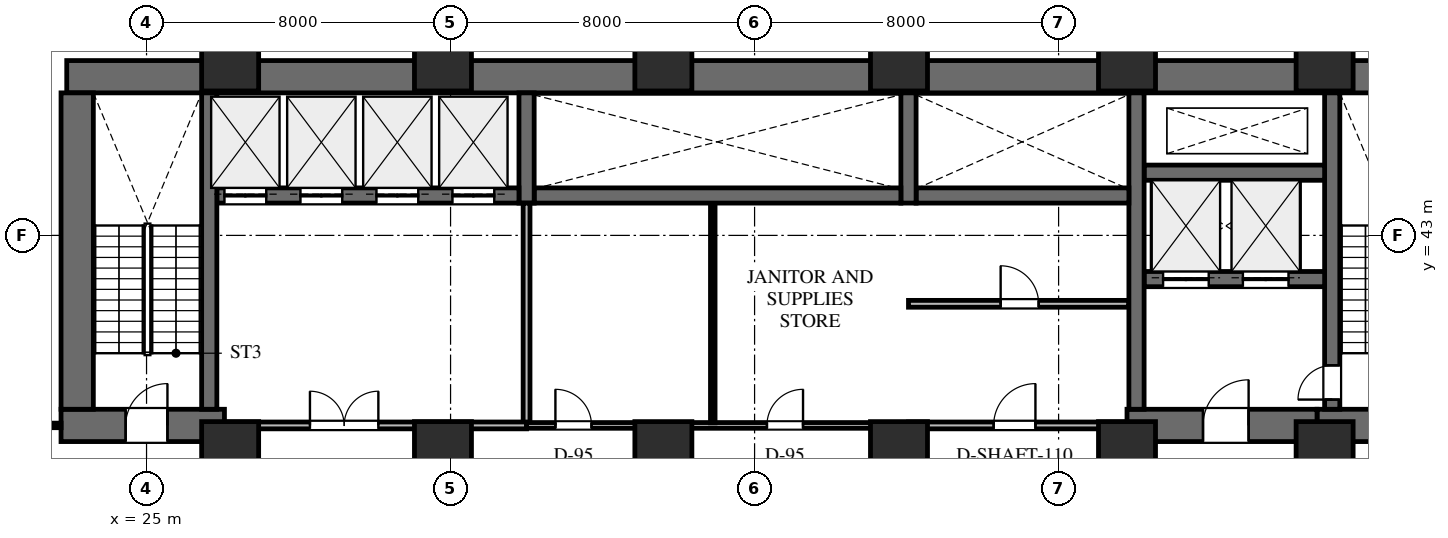
"""IFC4 building model, lengths in metres.
Left out: names, types, materials, properties, quantities, classifications, styles, units other than length and angle.
Written with IfcOpenShell. Run it as: python <this file> out.ifc"""

import sys

from ifc_helpers import new_model, si_unit, direction, frame, frame_2d, origin, origin_2d, place, context, subcontext, project, spatial, rectangle, extrude, element, fill, save


model = new_model("IFC4")
c1 = context("Model", 3, precision=1e-05, world=origin(), true_north=direction((0.0, 1.0)))
c2 = subcontext(c1, "Body", "Model", "MODEL_VIEW")
j1 = project(units=[si_unit("LENGTHUNIT", "METRE"), si_unit("PLANEANGLEUNIT", "RADIAN")], contexts=[c1])
p1 = place(None, origin())
s1 = spatial("IfcSite", under=j1, at=p1, CompositionType="ELEMENT")
p2 = place(p1, origin())
s2 = spatial("IfcBuilding", under=s1, at=p2, CompositionType="ELEMENT")
p3 = place(p2, frame((0.0, 0.0, 10.8)))
s3 = spatial("IfcBuildingStorey", under=s2, at=p3, CompositionType="ELEMENT", Elevation=10.8)
p4 = place(p3, frame((22.9, 47.175, 0.0), z_axis=(0.0, 0.0, 1.0), x_axis=(1.0, 0.0, 0.0)))
e1 = element("IfcWall", 1, at=p4, inside=s3, PredefinedType="SHEAR", context=c2, shape_type="SweptSolid", body=[
    extrude(rectangle(XDim=43.8, YDim=0.85, at=frame_2d((21.9, 0.0))), origin(), (0.0, 0.0, 1.0), 4.5),
])
p5 = place(p3, frame((55.8, 38.0, 0.0), z_axis=(0.0, 0.0, 1.0), x_axis=(1.0, 0.0, 0.0)))
e2 = element("IfcWall", 2, at=p5, inside=s3, PredefinedType="SHEAR", context=c2, shape_type="SweptSolid", body=[
    extrude(rectangle(XDim=10.9, YDim=0.85, at=frame_2d((5.45, 0.0))), origin(), (0.0, 0.0, 1.0), 4.5),
])
p6 = place(p5, frame((1.5, 0.0, 0.0)))
e3 = element("IfcOpeningElement", 3, at=p6, cuts=e2, PredefinedType="OPENING", context=c2, shape_type="SweptSolid", body=[
    extrude(rectangle(XDim=1.1, YDim=2.2, at=frame_2d((0.55, 1.1))), frame((0.0, 0.435, 0.0), z_axis=(0.0, -1.0, 0.0), x_axis=(1.0, 0.0, 0.0)), (0.0, 0.0, 1.0), 0.87),
])
p7 = place(p5, frame((4.82, 0.0, 0.0)))
e4 = element("IfcOpeningElement", 4, at=p7, cuts=e2, PredefinedType="OPENING", context=c2, shape_type="SweptSolid", body=[
    extrude(rectangle(XDim=1.0, YDim=2.15, at=frame_2d((0.5, 1.075))), frame((0.0, 0.435, 0.0), z_axis=(0.0, -1.0, 0.0), x_axis=(1.0, 0.0, 0.0)), (0.0, 0.0, 1.0), 0.87),
])
p8 = place(p5, frame((8.05, 0.0, 0.0)))
e5 = element("IfcOpeningElement", 5, at=p8, cuts=e2, PredefinedType="OPENING", context=c2, shape_type="SweptSolid", body=[
    extrude(rectangle(XDim=1.1, YDim=2.2, at=frame_2d((0.55, 1.1))), frame((0.0, 0.435, 0.0), z_axis=(0.0, -1.0, 0.0), x_axis=(1.0, 0.0, 0.0)), (0.0, 0.0, 1.0), 0.87),
])
p9 = place(p3, frame((56.2, 38.425, 0.0), z_axis=(0.0, 0.0, 1.0), x_axis=(0.0, 1.0, 0.0)))
e6 = element("IfcWall", 6, at=p9, inside=s3, PredefinedType="SHEAR", context=c2, shape_type="SweptSolid", body=[
    extrude(rectangle(XDim=8.325, YDim=0.4, at=frame_2d((4.163, 0.0))), origin(), (0.0, 0.0, 1.0), 4.5),
])
p10 = place(p9, frame((0.255, 0.0, 0.0)))
e7 = element("IfcOpeningElement", 7, at=p10, cuts=e6, PredefinedType="OPENING", context=c2, shape_type="SweptSolid", body=[
    extrude(rectangle(XDim=0.9, YDim=2.15, at=frame_2d((0.45, 1.075))), frame((0.0, 0.21, 0.0), z_axis=(0.0, -1.0, 0.0), x_axis=(1.0, 0.0, 0.0)), (0.0, 0.0, 1.0), 0.42),
])
p11 = place(p3, frame((50.8, 38.0, 0.0), z_axis=(0.0, 0.0, 1.0), x_axis=(1.0, 0.0, 0.0)))
e8 = element("IfcWall", 8, at=p11, inside=s3, PredefinedType="SHEAR", context=c2, shape_type="SweptSolid", body=[
    extrude(rectangle(XDim=5.0, YDim=0.85, at=frame_2d((2.5, 0.0))), origin(), (0.0, 0.0, 1.0), 4.5),
])
p12 = place(p11, frame((2.0, 0.0, 0.0)))
e9 = element("IfcOpeningElement", 9, at=p12, cuts=e8, PredefinedType="OPENING", context=c2, shape_type="SweptSolid", body=[
    extrude(rectangle(XDim=1.2, YDim=2.2, at=frame_2d((0.6, 1.1))), frame((0.0, 0.435, 0.0), z_axis=(0.0, -1.0, 0.0), x_axis=(1.0, 0.0, 0.0)), (0.0, 0.0, 1.0), 0.87),
])
p13 = place(p3, frame((51.25, 41.85, 0.0), z_axis=(0.0, 0.0, 1.0), x_axis=(1.0, 0.0, 0.0)))
e10 = element("IfcWall", 10, at=p13, inside=s3, PredefinedType="SHEAR", context=c2, shape_type="SweptSolid", body=[
    extrude(rectangle(XDim=4.75, YDim=0.4, at=frame_2d((2.375, 0.0))), origin(), (0.0, 0.0, 1.0), 4.5),
])
p14 = place(p13, frame((0.5, 0.0, 0.0)))
e11 = element("IfcOpeningElement", 11, at=p14, cuts=e10, PredefinedType="OPENING", context=c2, shape_type="SweptSolid", body=[
    extrude(rectangle(XDim=1.2, YDim=2.2, at=frame_2d((0.6, 1.1))), frame((0.0, 0.21, 0.0), z_axis=(0.0, -1.0, 0.0), x_axis=(1.0, 0.0, 0.0)), (0.0, 0.0, 1.0), 0.42),
])
p15 = place(p13, frame((2.6, 0.0, 0.0)))
e12 = element("IfcOpeningElement", 12, at=p15, cuts=e10, PredefinedType="OPENING", context=c2, shape_type="SweptSolid", body=[
    extrude(rectangle(XDim=1.2, YDim=2.2, at=frame_2d((0.6, 1.1))), frame((0.0, 0.21, 0.0), z_axis=(0.0, -1.0, 0.0), x_axis=(1.0, 0.0, 0.0)), (0.0, 0.0, 1.0), 0.42),
])
p16 = place(p3, frame((51.25, 44.65, 0.0), z_axis=(0.0, 0.0, 1.0), x_axis=(1.0, 0.0, 0.0)))
e13 = element("IfcWall", 13, at=p16, inside=s3, PredefinedType="SHEAR", context=c2, shape_type="SweptSolid", body=[
    extrude(rectangle(XDim=4.75, YDim=0.4, at=frame_2d((2.375, 0.0))), origin(), (0.0, 0.0, 1.0), 4.5),
])
p17 = place(p3, frame((51.05, 38.425, 0.0), z_axis=(0.0, 0.0, 1.0), x_axis=(0.0, 1.0, 0.0)))
e14 = element("IfcWall", 14, at=p17, inside=s3, PredefinedType="SHEAR", context=c2, shape_type="SweptSolid", body=[
    extrude(rectangle(XDim=8.325, YDim=0.4, at=frame_2d((4.163, 0.0))), origin(), (0.0, 0.0, 1.0), 4.5),
])
p18 = place(p3, frame((45.25, 44.05, 0.0), z_axis=(0.0, 0.0, 1.0), x_axis=(1.0, 0.0, 0.0)))
e15 = element("IfcWall", 15, at=p18, inside=s3, PredefinedType="SHEAR", context=c2, shape_type="SweptSolid", body=[
    extrude(rectangle(XDim=5.6, YDim=0.4, at=frame_2d((2.8, 0.0))), origin(), (0.0, 0.0, 1.0), 4.5),
])
p19 = place(p3, frame((45.05, 43.85, 0.0), z_axis=(0.0, 0.0, 1.0), x_axis=(0.0, 1.0, 0.0)))
e16 = element("IfcWall", 16, at=p19, inside=s3, PredefinedType="SHEAR", context=c2, shape_type="SweptSolid", body=[
    extrude(rectangle(XDim=2.9, YDim=0.4, at=frame_2d((1.45, 0.0))), origin(), (0.0, 0.0, 1.0), 4.5),
])
p20 = place(p3, frame((35.2, 44.05, 0.0), z_axis=(0.0, 0.0, 1.0), x_axis=(1.0, 0.0, 0.0)))
e17 = element("IfcWall", 17, at=p20, inside=s3, PredefinedType="SHEAR", context=c2, shape_type="SweptSolid", body=[
    extrude(rectangle(XDim=9.65, YDim=0.4, at=frame_2d((4.825, 0.0))), origin(), (0.0, 0.0, 1.0), 4.5),
])
p21 = place(p3, frame((35.0, 43.85, 0.0), z_axis=(0.0, 0.0, 1.0), x_axis=(0.0, 1.0, 0.0)))
e18 = element("IfcWall", 18, at=p21, inside=s3, PredefinedType="SHEAR", context=c2, shape_type="SweptSolid", body=[
    extrude(rectangle(XDim=2.9, YDim=0.4, at=frame_2d((1.45, 0.0))), origin(), (0.0, 0.0, 1.0), 4.5),
])
p22 = place(p3, frame((26.85, 44.05, 0.0), z_axis=(0.0, 0.0, 1.0), x_axis=(1.0, 0.0, 0.0)))
e19 = element("IfcWall", 19, at=p22, inside=s3, PredefinedType="SHEAR", context=c2, shape_type="SweptSolid", body=[
    extrude(rectangle(XDim=7.95, YDim=0.4, at=frame_2d((3.975, 0.0))), origin(), (0.0, 0.0, 1.0), 4.5),
])
p23 = place(p22, frame((0.2, 0.0, 0.0)))
e20 = element("IfcOpeningElement", 20, at=p23, cuts=e19, PredefinedType="OPENING", context=c2, shape_type="SweptSolid", body=[
    extrude(rectangle(XDim=1.1, YDim=2.2, at=frame_2d((0.55, 1.1))), frame((0.0, 0.21, 0.0), z_axis=(0.0, -1.0, 0.0), x_axis=(1.0, 0.0, 0.0)), (0.0, 0.0, 1.0), 0.42),
])
p24 = place(p22, frame((2.2, 0.0, 0.0)))
e21 = element("IfcOpeningElement", 21, at=p24, cuts=e19, PredefinedType="OPENING", context=c2, shape_type="SweptSolid", body=[
    extrude(rectangle(XDim=1.1, YDim=2.2, at=frame_2d((0.55, 1.1))), frame((0.0, 0.21, 0.0), z_axis=(0.0, -1.0, 0.0), x_axis=(1.0, 0.0, 0.0)), (0.0, 0.0, 1.0), 0.42),
])
p25 = place(p22, frame((4.2, 0.0, 0.0)))
e22 = element("IfcOpeningElement", 22, at=p25, cuts=e19, PredefinedType="OPENING", context=c2, shape_type="SweptSolid", body=[
    extrude(rectangle(XDim=1.1, YDim=2.2, at=frame_2d((0.55, 1.1))), frame((0.0, 0.21, 0.0), z_axis=(0.0, -1.0, 0.0), x_axis=(1.0, 0.0, 0.0)), (0.0, 0.0, 1.0), 0.42),
])
p26 = place(p22, frame((6.2, 0.0, 0.0)))
e23 = element("IfcOpeningElement", 23, at=p26, cuts=e19, PredefinedType="OPENING", context=c2, shape_type="SweptSolid", body=[
    extrude(rectangle(XDim=1.1, YDim=2.2, at=frame_2d((0.55, 1.1))), frame((0.0, 0.21, 0.0), z_axis=(0.0, -1.0, 0.0), x_axis=(1.0, 0.0, 0.0)), (0.0, 0.0, 1.0), 0.42),
])
p27 = place(p3, frame((22.75, 38.0, 0.0), z_axis=(0.0, 0.0, 1.0), x_axis=(1.0, 0.0, 0.0)))
e24 = element("IfcWall", 24, at=p27, inside=s3, PredefinedType="SHEAR", context=c2, shape_type="SweptSolid", body=[
    extrude(rectangle(XDim=4.3, YDim=0.85, at=frame_2d((2.15, 0.0))), origin(), (0.0, 0.0, 1.0), 4.5),
])
p28 = place(p27, frame((1.7, 0.0, 0.0)))
e25 = element("IfcOpeningElement", 25, at=p28, cuts=e24, PredefinedType="OPENING", context=c2, shape_type="SweptSolid", body=[
    extrude(rectangle(XDim=1.1, YDim=2.2, at=frame_2d((0.55, 1.1))), frame((0.0, 0.435, 0.0), z_axis=(0.0, -1.0, 0.0), x_axis=(1.0, 0.0, 0.0)), (0.0, 0.0, 1.0), 0.87),
])
p29 = place(p3, frame((23.175, 38.425, 0.0), z_axis=(0.0, 0.0, 1.0), x_axis=(0.0, 1.0, 0.0)))
e26 = element("IfcWall", 26, at=p29, inside=s3, PredefinedType="SHEAR", context=c2, shape_type="SweptSolid", body=[
    extrude(rectangle(XDim=8.325, YDim=0.85, at=frame_2d((4.163, 0.0))), origin(), (0.0, 0.0, 1.0), 4.5),
])
p30 = place(p3, frame((26.65, 38.425, 0.0), z_axis=(0.0, 0.0, 1.0), x_axis=(0.0, 1.0, 0.0)))
e27 = element("IfcWall", 27, at=p30, inside=s3, PredefinedType="SHEAR", context=c2, shape_type="SweptSolid", body=[
    extrude(rectangle(XDim=8.325, YDim=0.4, at=frame_2d((4.163, 0.0))), origin(), (0.0, 0.0, 1.0), 4.5),
])
for number, where, z_axis, x_axis in (
    (28, (56.0, 47.55, 0.0), (0.0, 0.0, 1.0), (1.0, 0.0, 0.0)),
    (29, (56.0, 37.35, 0.0), (0.0, 0.0, 1.0), (1.0, 0.0, 0.0)),
    (30, (50.8, 47.55, 0.0), (0.0, 0.0, 1.0), (1.0, 0.0, 0.0)),
    (31, (50.8, 37.35, 0.0), (0.0, 0.0, 1.0), (1.0, 0.0, 0.0)),
    (32, (44.8, 37.35, 0.0), (0.0, 0.0, 1.0), (1.0, 0.0, 0.0)),
    (33, (44.8, 47.55, 0.0), (0.0, 0.0, 1.0), (1.0, 0.0, 0.0)),
    (34, (38.6, 37.35, 0.0), (0.0, 0.0, 1.0), (1.0, 0.0, 0.0)),
    (35, (38.6, 47.55, 0.0), (0.0, 0.0, 1.0), (1.0, 0.0, 0.0)),
    (36, (32.8, 37.35, 0.0), (0.0, 0.0, 1.0), (1.0, 0.0, 0.0)),
    (37, (32.8, 47.55, 0.0), (0.0, 0.0, 1.0), (1.0, 0.0, 0.0)),
    (38, (27.2, 37.35, 0.0), (0.0, 0.0, 1.0), (1.0, 0.0, 0.0)),
    (39, (27.2, 47.55, 0.0), (0.0, 0.0, 1.0), (1.0, 0.0, 0.0)),
):
    element("IfcColumn", number, at=place(p3, frame(where, z_axis=z_axis, x_axis=x_axis)), inside=s3, PredefinedType="COLUMN", context=c2, shape_type="SweptSolid", body=[
        extrude(rectangle(XDim=1.5, YDim=1.5, at=origin_2d()), origin(), (0.0, 0.0, 1.0), 4.5),
    ])
p31 = place(p3, frame((45.05, 38.0, 0.0), z_axis=(0.0, 0.0, 1.0), x_axis=(1.0, 0.0, 0.0)))
e40 = element("IfcWall", 40, at=p31, inside=s3, PredefinedType="STANDARD", context=c2, shape_type="SweptSolid", body=[
    extrude(rectangle(XDim=5.75, YDim=0.18, at=frame_2d((2.875, 0.0))), origin(), (0.0, 0.0, 1.0), 3.282),
])
p32 = place(p31, frame((2.24, 0.0, 0.0)))
e41 = element("IfcOpeningElement", 41, at=p32, cuts=e40, PredefinedType="OPENING", context=c2, shape_type="SweptSolid", body=[
    extrude(rectangle(XDim=1.1, YDim=2.2, at=frame_2d((0.55, 1.1))), frame((0.0, 0.1, 0.0), z_axis=(0.0, -1.0, 0.0), x_axis=(1.0, 0.0, 0.0)), (0.0, 0.0, 1.0), 0.2),
])
p33 = place(p3, frame((45.05, 41.2, 0.0), z_axis=(0.0, 0.0, 1.0), x_axis=(1.0, 0.0, 0.0)))
e42 = element("IfcWall", 42, at=p33, inside=s3, PredefinedType="STANDARD", context=c2, shape_type="SweptSolid", body=[
    extrude(rectangle(XDim=5.792, YDim=0.18, at=frame_2d((2.896, 0.0))), origin(), (0.0, 0.0, 1.0), 3.282),
])
p34 = place(p33, frame((2.425, 0.0, 0.0)))
e43 = element("IfcOpeningElement", 43, at=p34, cuts=e42, PredefinedType="OPENING", context=c2, shape_type="SweptSolid", body=[
    extrude(rectangle(XDim=1.0, YDim=2.15, at=frame_2d((0.5, 1.075))), frame((0.0, 0.1, 0.0), z_axis=(0.0, -1.0, 0.0), x_axis=(1.0, 0.0, 0.0)), (0.0, 0.0, 1.0), 0.2),
])
p35 = place(p3, frame((35.0, 38.0, 0.0), z_axis=(0.0, 0.0, 1.0), x_axis=(0.0, 1.0, 0.0)))
e44 = element("IfcWall", 44, at=p35, inside=s3, PredefinedType="STANDARD", context=c2, shape_type="SweptSolid", body=[
    extrude(rectangle(XDim=5.85, YDim=0.18, at=frame_2d((2.925, 0.0))), origin(), (0.0, 0.0, 1.0), 4.23),
])
p36 = place(p3, frame((27.05, 38.0, 0.0), z_axis=(0.0, 0.0, 1.0), x_axis=(1.0, 0.0, 0.0)))
e45 = element("IfcWall", 45, at=p36, inside=s3, PredefinedType="STANDARD", context=c2, shape_type="SweptSolid", body=[
    extrude(rectangle(XDim=7.95, YDim=0.18, at=frame_2d((3.975, 0.0))), origin(), (0.0, 0.0, 1.0), 3.282),
])
p37 = place(p36, frame((2.25, 0.0, 0.0)))
e46 = element("IfcOpeningElement", 46, at=p37, cuts=e45, PredefinedType="OPENING", context=c2, shape_type="SweptSolid", body=[
    extrude(rectangle(XDim=1.8, YDim=2.2, at=frame_2d((0.9, 1.1))), frame((0.0, 0.1, 0.0), z_axis=(0.0, -1.0, 0.0), x_axis=(1.0, 0.0, 0.0)), (0.0, 0.0, 1.0), 0.2),
])
p38 = place(p3, frame((35.0, 38.0, 0.0), z_axis=(0.0, 0.0, 1.0), x_axis=(1.0, 0.0, 0.0)))
e47 = element("IfcWall", 47, at=p38, inside=s3, PredefinedType="PARTITIONING", context=c2, shape_type="SweptSolid", body=[
    extrude(rectangle(XDim=10.05, YDim=0.15, at=frame_2d((5.025, 0.0))), origin(), (0.0, 0.0, 1.0), 3.282),
])
p39 = place(p38, frame((0.759, 0.0, 0.0)))
e48 = element("IfcOpeningElement", 48, at=p39, cuts=e47, PredefinedType="OPENING", context=c2, shape_type="SweptSolid", body=[
    extrude(rectangle(XDim=0.95, YDim=2.15, at=frame_2d((0.475, 1.075))), frame((0.0, 0.085, 0.0), z_axis=(0.0, -1.0, 0.0), x_axis=(1.0, 0.0, 0.0)), (0.0, 0.0, 1.0), 0.17),
])
p40 = place(p38, frame((6.325, 0.0, 0.0)))
e49 = element("IfcOpeningElement", 49, at=p40, cuts=e47, PredefinedType="OPENING", context=c2, shape_type="SweptSolid", body=[
    extrude(rectangle(XDim=0.95, YDim=2.15, at=frame_2d((0.475, 1.075))), frame((0.0, 0.085, 0.0), z_axis=(0.0, -1.0, 0.0), x_axis=(1.0, 0.0, 0.0)), (0.0, 0.0, 1.0), 0.17),
])
p41 = place(p3, frame((39.9, 38.068, 0.0), z_axis=(0.0, 0.0, 1.0), x_axis=(0.0, 1.0, 0.0)))
e50 = element("IfcWall", 50, at=p41, inside=s3, PredefinedType="PARTITIONING", context=c2, shape_type="SweptSolid", body=[
    extrude(rectangle(XDim=5.774, YDim=0.12, at=frame_2d((2.887, 0.0))), origin(), (0.0, 0.0, 1.0), 4.23),
])
p42 = place(p3, frame((8.2, 38.0, 0.0), z_axis=(0.0, 0.0, 1.0), x_axis=(1.0, 0.0, 0.0)))
e51 = element("IfcWall", 51, at=p42, inside=s3, PredefinedType="PARTITIONING", context=c2, shape_type="SweptSolid", body=[
    extrude(rectangle(XDim=14.55, YDim=0.12, at=frame_2d((7.275, 0.0))), origin(), (0.0, 0.0, 1.0), 3.282),
])
p43 = place(p42, frame((1.482, 0.0, 0.0)))
e52 = element("IfcOpeningElement", 52, at=p43, cuts=e51, PredefinedType="OPENING", context=c2, shape_type="SweptSolid", body=[
    extrude(rectangle(XDim=0.95, YDim=2.15, at=frame_2d((0.475, 1.075))), frame((0.0, 0.07, 0.0), z_axis=(0.0, -1.0, 0.0), x_axis=(1.0, 0.0, 0.0)), (0.0, 0.0, 1.0), 0.14),
])
p44 = place(p42, frame((5.37, 0.0, 0.0)))
e53 = element("IfcOpeningElement", 53, at=p44, cuts=e51, PredefinedType="OPENING", context=c2, shape_type="SweptSolid", body=[
    extrude(rectangle(XDim=0.95, YDim=2.15, at=frame_2d((0.475, 1.075))), frame((0.0, 0.07, 0.0), z_axis=(0.0, -1.0, 0.0), x_axis=(1.0, 0.0, 0.0)), (0.0, 0.0, 1.0), 0.14),
])
p45 = place(p42, frame((11.437, 0.0, 0.0)))
e54 = element("IfcOpeningElement", 54, at=p45, cuts=e51, PredefinedType="OPENING", context=c2, shape_type="SweptSolid", body=[
    extrude(rectangle(XDim=0.95, YDim=2.15, at=frame_2d((0.475, 1.075))), frame((0.0, 0.07, 0.0), z_axis=(0.0, -1.0, 0.0), x_axis=(1.0, 0.0, 0.0)), (0.0, 0.0, 1.0), 0.14),
])
p46 = place(p12, origin())
e55 = element("IfcDoor", 55, at=p46, inside=s3, OperationType="SINGLE_SWING_RIGHT", PredefinedType="DOOR", context=c2, shape_type="SweptSolid", body=[
    extrude(rectangle(XDim=1.2, YDim=2.2, at=frame_2d((0.6, 1.1))), frame((0.0, 0.025, 0.0), z_axis=(0.0, -1.0, 0.0), x_axis=(1.0, 0.0, 0.0)), (0.0, 0.0, 1.0), 0.05),
])
fill(e9, e55)
p47 = place(p10, origin())
e56 = element("IfcDoor", 56, at=p47, inside=s3, OperationType="SINGLE_SWING_LEFT", PredefinedType="DOOR", context=c2, shape_type="SweptSolid", body=[
    extrude(rectangle(XDim=0.9, YDim=2.15, at=frame_2d((0.45, 1.075))), frame((0.0, 0.025, 0.0), z_axis=(0.0, -1.0, 0.0), x_axis=(1.0, 0.0, 0.0)), (0.0, 0.0, 1.0), 0.05),
])
fill(e7, e56)
p48 = place(p28, origin())
e57 = element("IfcDoor", 57, at=p48, inside=s3, OperationType="SINGLE_SWING_RIGHT", PredefinedType="DOOR", context=c2, shape_type="SweptSolid", body=[
    extrude(rectangle(XDim=1.1, YDim=2.2, at=frame_2d((0.55, 1.1))), frame((0.0, 0.025, 0.0), z_axis=(0.0, -1.0, 0.0), x_axis=(1.0, 0.0, 0.0)), (0.0, 0.0, 1.0), 0.05),
])
fill(e25, e57)
p49 = place(p23, origin())
e58 = element("IfcDoor", 58, at=p49, inside=s3, OperationType="DOUBLE_DOOR_SLIDING", PredefinedType="DOOR", context=c2, shape_type="SweptSolid", body=[
    extrude(rectangle(XDim=1.1, YDim=2.2, at=frame_2d((0.55, 1.1))), frame((0.0, 0.025, 0.0), z_axis=(0.0, -1.0, 0.0), x_axis=(1.0, 0.0, 0.0)), (0.0, 0.0, 1.0), 0.05),
])
fill(e20, e58)
p50 = place(p24, origin())
e59 = element("IfcDoor", 59, at=p50, inside=s3, OperationType="DOUBLE_DOOR_SLIDING", PredefinedType="DOOR", context=c2, shape_type="SweptSolid", body=[
    extrude(rectangle(XDim=1.1, YDim=2.2, at=frame_2d((0.55, 1.1))), frame((0.0, 0.025, 0.0), z_axis=(0.0, -1.0, 0.0), x_axis=(1.0, 0.0, 0.0)), (0.0, 0.0, 1.0), 0.05),
])
fill(e21, e59)
p51 = place(p25, origin())
e60 = element("IfcDoor", 60, at=p51, inside=s3, OperationType="DOUBLE_DOOR_SLIDING", PredefinedType="DOOR", context=c2, shape_type="SweptSolid", body=[
    extrude(rectangle(XDim=1.1, YDim=2.2, at=frame_2d((0.55, 1.1))), frame((0.0, 0.025, 0.0), z_axis=(0.0, -1.0, 0.0), x_axis=(1.0, 0.0, 0.0)), (0.0, 0.0, 1.0), 0.05),
])
fill(e22, e60)
p52 = place(p26, origin())
e61 = element("IfcDoor", 61, at=p52, inside=s3, OperationType="DOUBLE_DOOR_SLIDING", PredefinedType="DOOR", context=c2, shape_type="SweptSolid", body=[
    extrude(rectangle(XDim=1.1, YDim=2.2, at=frame_2d((0.55, 1.1))), frame((0.0, 0.025, 0.0), z_axis=(0.0, -1.0, 0.0), x_axis=(1.0, 0.0, 0.0)), (0.0, 0.0, 1.0), 0.05),
])
fill(e23, e61)
p53 = place(p14, origin())
e62 = element("IfcDoor", 62, at=p53, inside=s3, OperationType="DOUBLE_DOOR_SLIDING", PredefinedType="DOOR", context=c2, shape_type="SweptSolid", body=[
    extrude(rectangle(XDim=1.2, YDim=2.2, at=frame_2d((0.6, 1.1))), frame((0.0, 0.025, 0.0), z_axis=(0.0, -1.0, 0.0), x_axis=(1.0, 0.0, 0.0)), (0.0, 0.0, 1.0), 0.05),
])
fill(e11, e62)
p54 = place(p15, origin())
e63 = element("IfcDoor", 63, at=p54, inside=s3, OperationType="DOUBLE_DOOR_SLIDING", PredefinedType="DOOR", context=c2, shape_type="SweptSolid", body=[
    extrude(rectangle(XDim=1.2, YDim=2.2, at=frame_2d((0.6, 1.1))), frame((0.0, 0.025, 0.0), z_axis=(0.0, -1.0, 0.0), x_axis=(1.0, 0.0, 0.0)), (0.0, 0.0, 1.0), 0.05),
])
fill(e12, e63)
p55 = place(p34, origin())
e64 = element("IfcDoor", 64, at=p55, inside=s3, OperationType="SINGLE_SWING_LEFT", PredefinedType="DOOR", context=c2, shape_type="SweptSolid", body=[
    extrude(rectangle(XDim=1.0, YDim=2.15, at=frame_2d((0.5, 1.075))), frame((0.0, 0.025, 0.0), z_axis=(0.0, -1.0, 0.0), x_axis=(1.0, 0.0, 0.0)), (0.0, 0.0, 1.0), 0.05),
])
fill(e43, e64)
p56 = place(p32, origin())
e65 = element("IfcDoor", 65, at=p56, inside=s3, OperationType="SINGLE_SWING_RIGHT", PredefinedType="DOOR", context=c2, shape_type="SweptSolid", body=[
    extrude(rectangle(XDim=1.1, YDim=2.2, at=frame_2d((0.55, 1.1))), frame((0.0, 0.025, 0.0), z_axis=(0.0, -1.0, 0.0), x_axis=(1.0, 0.0, 0.0)), (0.0, 0.0, 1.0), 0.05),
])
fill(e41, e65)
p57 = place(p37, origin())
e66 = element("IfcDoor", 66, at=p57, inside=s3, OperationType="DOUBLE_DOOR_SINGLE_SWING", PredefinedType="DOOR", context=c2, shape_type="SweptSolid", body=[
    extrude(rectangle(XDim=1.8, YDim=2.2, at=frame_2d((0.9, 1.1))), frame((0.0, 0.025, 0.0), z_axis=(0.0, -1.0, 0.0), x_axis=(1.0, 0.0, 0.0)), (0.0, 0.0, 1.0), 0.05),
])
fill(e46, e66)
p58 = place(p39, origin())
e67 = element("IfcDoor", 67, at=p58, inside=s3, OperationType="SINGLE_SWING_LEFT", PredefinedType="DOOR", context=c2, shape_type="SweptSolid", body=[
    extrude(rectangle(XDim=0.95, YDim=2.15, at=frame_2d((0.475, 1.075))), frame((0.0, 0.025, 0.0), z_axis=(0.0, -1.0, 0.0), x_axis=(1.0, 0.0, 0.0)), (0.0, 0.0, 1.0), 0.05),
])
fill(e48, e67)
p59 = place(p40, origin())
e68 = element("IfcDoor", 68, at=p59, inside=s3, OperationType="SINGLE_SWING_RIGHT", PredefinedType="DOOR", context=c2, shape_type="SweptSolid", body=[
    extrude(rectangle(XDim=0.95, YDim=2.15, at=frame_2d((0.475, 1.075))), frame((0.0, 0.025, 0.0), z_axis=(0.0, -1.0, 0.0), x_axis=(1.0, 0.0, 0.0)), (0.0, 0.0, 1.0), 0.05),
])
fill(e49, e68)
save(model, sys.argv[1])
